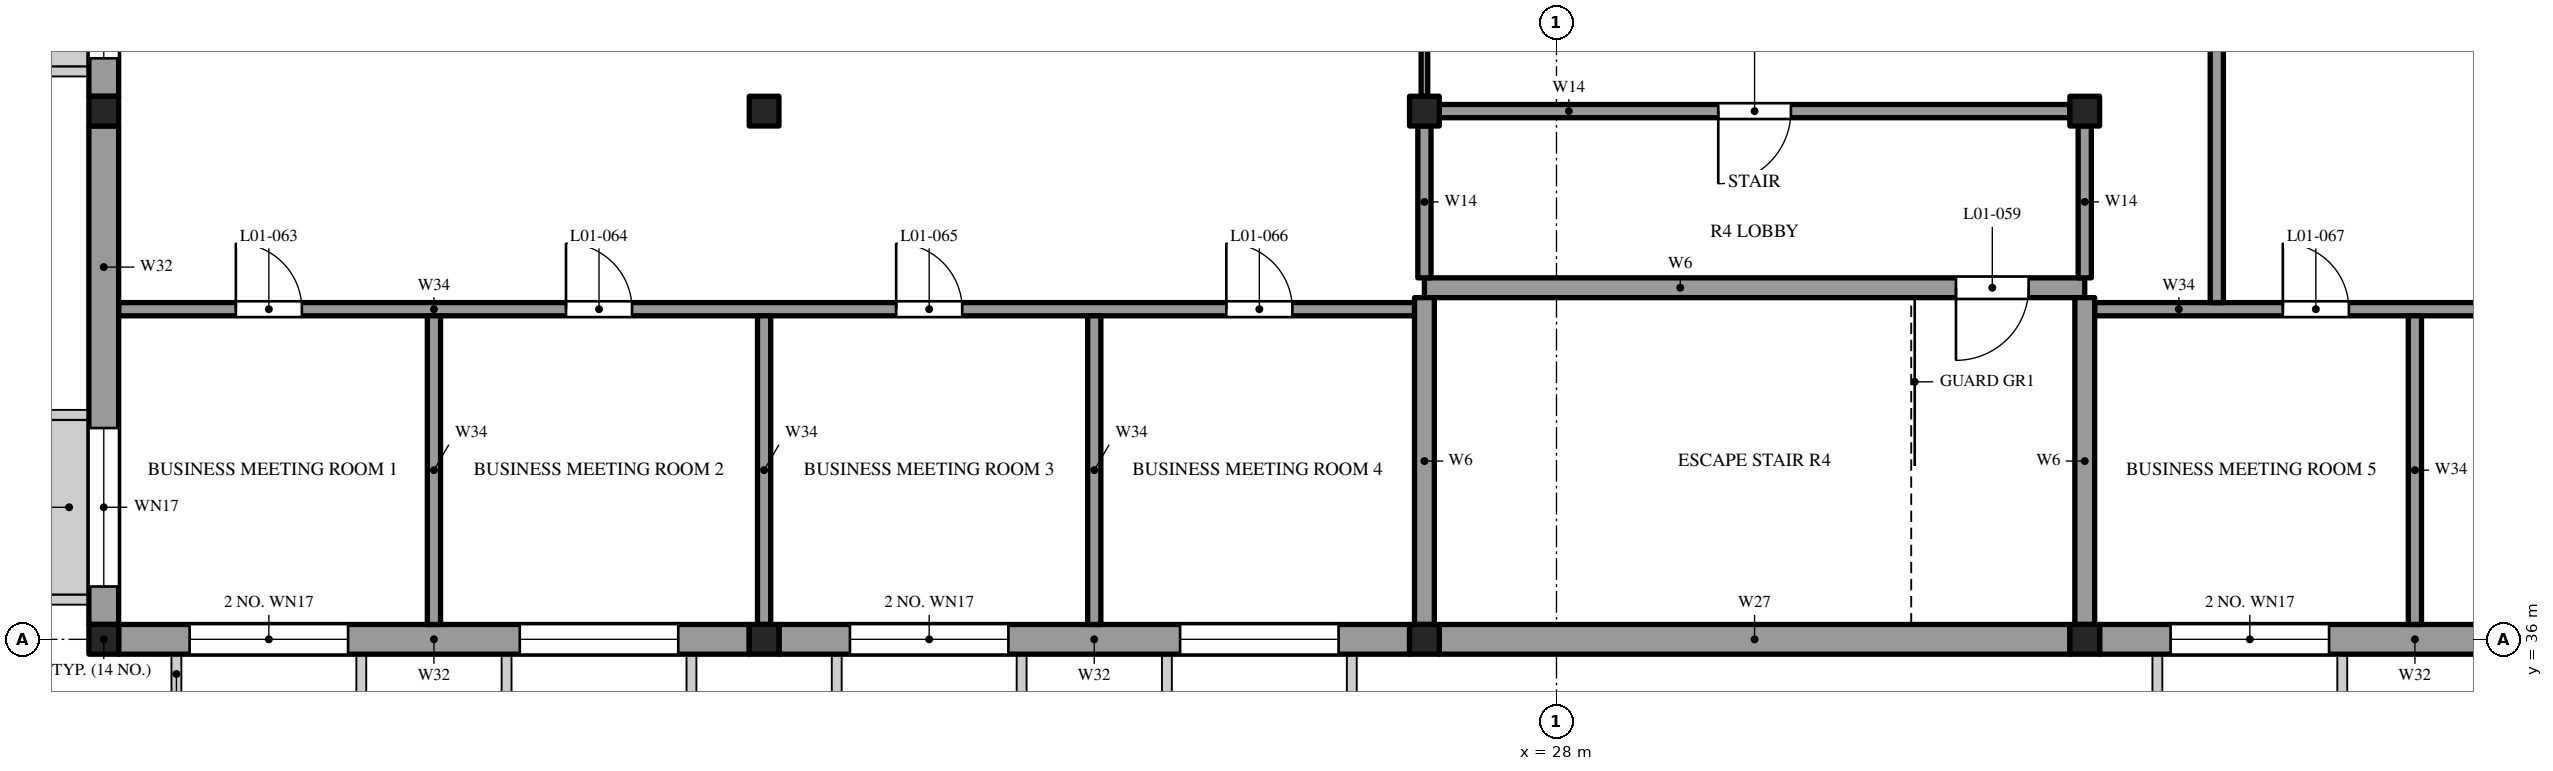
"""IFC4 building model, lengths in metres.
Left out: names, types, materials, properties, quantities, classifications, styles, units other than length and angle.
Written with IfcOpenShell. Run it as: python <this file> out.ifc"""

import sys

from ifc_helpers import new_model, si_unit, direction, frame, frame_2d, origin, origin_2d, place, context, subcontext, project, spatial, rectangle, extrude, element, fill, save


model = new_model("IFC4")
c1 = context("Model", 3, precision=1e-05, world=origin(), true_north=direction((0.0, 1.0)))
c2 = subcontext(c1, "Body", "Model", "MODEL_VIEW")
j1 = project(units=[si_unit("LENGTHUNIT", "METRE"), si_unit("PLANEANGLEUNIT", "RADIAN")], contexts=[c1])
p1 = place(None, origin())
s1 = spatial("IfcSite", under=j1, at=p1, CompositionType="ELEMENT")
p2 = place(p1, origin())
s2 = spatial("IfcBuilding", under=s1, at=p2, CompositionType="ELEMENT")
p3 = place(p2, frame((0.0, 0.0, 7.2)))
s3 = spatial("IfcBuildingStorey", under=s2, at=p3, CompositionType="ELEMENT", Elevation=7.2)
for number, where, z_axis, x_axis in (
    (1, (6.0, 36.0, 0.0), (0.0, 0.0, 1.0), (1.0, 0.0, 0.0)),
    (2, (6.0, 44.0, 0.0), (0.0, 0.0, 1.0), (1.0, 0.0, 0.0)),
    (3, (16.0, 36.0, 0.0), (0.0, 0.0, 1.0), (1.0, 0.0, 0.0)),
    (4, (16.0, 44.0, 0.0), (0.0, 0.0, 1.0), (1.0, 0.0, 0.0)),
    (5, (26.0, 36.0, 0.0), (0.0, 0.0, 1.0), (1.0, 0.0, 0.0)),
    (6, (26.0, 44.0, 0.0), (0.0, 0.0, 1.0), (1.0, 0.0, 0.0)),
    (7, (36.0, 36.0, 0.0), (0.0, 0.0, 1.0), (1.0, 0.0, 0.0)),
    (8, (36.0, 44.0, 0.0), (0.0, 0.0, 1.0), (1.0, 0.0, 0.0)),
):
    element("IfcColumn", number, at=place(p3, frame(where, z_axis=z_axis, x_axis=x_axis)), inside=s3, PredefinedType="COLUMN", context=c2, shape_type="SweptSolid", body=[
        extrude(rectangle(XDim=0.45, YDim=0.45, at=origin_2d()), origin(), (0.0, 0.0, 1.0), 4.8),
    ])
p4 = place(p3, frame((6.225, 36.0, 0.0), z_axis=(0.0, 0.0, 1.0), x_axis=(1.0, 0.0, 0.0)))
e9 = element("IfcWall", 9, at=p4, inside=s3, PredefinedType="SOLIDWALL", context=c2, shape_type="SweptSolid", body=[
    extrude(rectangle(XDim=9.55, YDim=0.45, at=frame_2d((4.775, 0.0))), origin(), (0.0, 0.0, 1.0), 4.45),
])
p5 = place(p4, frame((1.075, 0.0, 0.9)))
e10 = element("IfcOpeningElement", 10, at=p5, cuts=e9, PredefinedType="OPENING", context=c2, shape_type="SweptSolid", body=[
    extrude(rectangle(XDim=2.4, YDim=2.2, at=frame_2d((1.2, 1.1))), frame((0.0, 0.235, 0.0), z_axis=(0.0, -1.0, 0.0), x_axis=(1.0, 0.0, 0.0)), (0.0, 0.0, 1.0), 0.47),
])
p6 = place(p4, frame((6.075, 0.0, 0.9)))
e11 = element("IfcOpeningElement", 11, at=p6, cuts=e9, PredefinedType="OPENING", context=c2, shape_type="SweptSolid", body=[
    extrude(rectangle(XDim=2.4, YDim=2.2, at=frame_2d((1.2, 1.1))), frame((0.0, 0.235, 0.0), z_axis=(0.0, -1.0, 0.0), x_axis=(1.0, 0.0, 0.0)), (0.0, 0.0, 1.0), 0.47),
])
p7 = place(p3, frame((16.225, 36.0, 0.0), z_axis=(0.0, 0.0, 1.0), x_axis=(1.0, 0.0, 0.0)))
e12 = element("IfcWall", 12, at=p7, inside=s3, PredefinedType="SOLIDWALL", context=c2, shape_type="SweptSolid", body=[
    extrude(rectangle(XDim=9.55, YDim=0.45, at=frame_2d((4.775, 0.0))), origin(), (0.0, 0.0, 1.0), 4.45),
])
p8 = place(p7, frame((1.075, 0.0, 0.9)))
e13 = element("IfcOpeningElement", 13, at=p8, cuts=e12, PredefinedType="OPENING", context=c2, shape_type="SweptSolid", body=[
    extrude(rectangle(XDim=2.4, YDim=2.2, at=frame_2d((1.2, 1.1))), frame((0.0, 0.235, 0.0), z_axis=(0.0, -1.0, 0.0), x_axis=(1.0, 0.0, 0.0)), (0.0, 0.0, 1.0), 0.47),
])
p9 = place(p7, frame((6.075, 0.0, 0.9)))
e14 = element("IfcOpeningElement", 14, at=p9, cuts=e12, PredefinedType="OPENING", context=c2, shape_type="SweptSolid", body=[
    extrude(rectangle(XDim=2.4, YDim=2.2, at=frame_2d((1.2, 1.1))), frame((0.0, 0.235, 0.0), z_axis=(0.0, -1.0, 0.0), x_axis=(1.0, 0.0, 0.0)), (0.0, 0.0, 1.0), 0.47),
])
p10 = place(p3, frame((26.225, 36.0, 0.0), z_axis=(0.0, 0.0, 1.0), x_axis=(1.0, 0.0, 0.0)))
e15 = element("IfcWall", 15, at=p10, inside=s3, PredefinedType="SOLIDWALL", context=c2, shape_type="SweptSolid", body=[
    extrude(rectangle(XDim=9.55, YDim=0.45, at=frame_2d((4.775, 0.0))), origin(), (0.0, 0.0, 1.0), 4.45),
])
p11 = place(p3, frame((36.225, 36.0, 0.0), z_axis=(0.0, 0.0, 1.0), x_axis=(1.0, 0.0, 0.0)))
e16 = element("IfcWall", 16, at=p11, inside=s3, PredefinedType="SOLIDWALL", context=c2, shape_type="SweptSolid", body=[
    extrude(rectangle(XDim=9.55, YDim=0.45, at=frame_2d((4.775, 0.0))), origin(), (0.0, 0.0, 1.0), 4.45),
])
p12 = place(p11, frame((1.075, 0.0, 0.9)))
e17 = element("IfcOpeningElement", 17, at=p12, cuts=e16, PredefinedType="OPENING", context=c2, shape_type="SweptSolid", body=[
    extrude(rectangle(XDim=2.4, YDim=2.2, at=frame_2d((1.2, 1.1))), frame((0.0, 0.235, 0.0), z_axis=(0.0, -1.0, 0.0), x_axis=(1.0, 0.0, 0.0)), (0.0, 0.0, 1.0), 0.47),
])
p13 = place(p11, frame((6.075, 0.0, 0.9)))
e18 = element("IfcOpeningElement", 18, at=p13, cuts=e16, PredefinedType="OPENING", context=c2, shape_type="SweptSolid", body=[
    extrude(rectangle(XDim=2.4, YDim=2.2, at=frame_2d((1.2, 1.1))), frame((0.0, 0.235, 0.0), z_axis=(0.0, -1.0, 0.0), x_axis=(1.0, 0.0, 0.0)), (0.0, 0.0, 1.0), 0.47),
])
p14 = place(p3, frame((6.225, 41.0, 0.0), z_axis=(0.0, 0.0, 1.0), x_axis=(1.0, 0.0, 0.0)))
e19 = element("IfcWall", 19, at=p14, inside=s3, PredefinedType="PARTITIONING", context=c2, shape_type="SweptSolid", body=[
    extrude(rectangle(XDim=19.625, YDim=0.2, at=frame_2d((9.812, 0.0))), origin(), (0.0, 0.0, 1.0), 4.45),
])
p15 = place(p14, frame((1.775, 0.0, 0.0)))
e20 = element("IfcOpeningElement", 20, at=p15, cuts=e19, PredefinedType="OPENING", context=c2, shape_type="SweptSolid", body=[
    extrude(rectangle(XDim=1.0, YDim=2.1, at=frame_2d((0.5, 1.05))), frame((0.0, 0.11, 0.0), z_axis=(0.0, -1.0, 0.0), x_axis=(1.0, 0.0, 0.0)), (0.0, 0.0, 1.0), 0.22),
])
p16 = place(p14, frame((6.775, 0.0, 0.0)))
e21 = element("IfcOpeningElement", 21, at=p16, cuts=e19, PredefinedType="OPENING", context=c2, shape_type="SweptSolid", body=[
    extrude(rectangle(XDim=1.0, YDim=2.1, at=frame_2d((0.5, 1.05))), frame((0.0, 0.11, 0.0), z_axis=(0.0, -1.0, 0.0), x_axis=(1.0, 0.0, 0.0)), (0.0, 0.0, 1.0), 0.22),
])
p17 = place(p14, frame((11.775, 0.0, 0.0)))
e22 = element("IfcOpeningElement", 22, at=p17, cuts=e19, PredefinedType="OPENING", context=c2, shape_type="SweptSolid", body=[
    extrude(rectangle(XDim=1.0, YDim=2.1, at=frame_2d((0.5, 1.05))), frame((0.0, 0.11, 0.0), z_axis=(0.0, -1.0, 0.0), x_axis=(1.0, 0.0, 0.0)), (0.0, 0.0, 1.0), 0.22),
])
p18 = place(p14, frame((16.775, 0.0, 0.0)))
e23 = element("IfcOpeningElement", 23, at=p18, cuts=e19, PredefinedType="OPENING", context=c2, shape_type="SweptSolid", body=[
    extrude(rectangle(XDim=1.0, YDim=2.1, at=frame_2d((0.5, 1.05))), frame((0.0, 0.11, 0.0), z_axis=(0.0, -1.0, 0.0), x_axis=(1.0, 0.0, 0.0)), (0.0, 0.0, 1.0), 0.22),
])
p19 = place(p3, frame((36.15, 41.0, 0.0), z_axis=(0.0, 0.0, 1.0), x_axis=(1.0, 0.0, 0.0)))
e24 = element("IfcWall", 24, at=p19, inside=s3, PredefinedType="PARTITIONING", context=c2, shape_type="SweptSolid", body=[
    extrude(rectangle(XDim=9.625, YDim=0.2, at=frame_2d((4.812, 0.0))), origin(), (0.0, 0.0, 1.0), 4.45),
])
p20 = place(p19, frame((2.85, 0.0, 0.0)))
e25 = element("IfcOpeningElement", 25, at=p20, cuts=e24, PredefinedType="OPENING", context=c2, shape_type="SweptSolid", body=[
    extrude(rectangle(XDim=1.0, YDim=2.1, at=frame_2d((0.5, 1.05))), frame((0.0, 0.11, 0.0), z_axis=(0.0, -1.0, 0.0), x_axis=(1.0, 0.0, 0.0)), (0.0, 0.0, 1.0), 0.22),
])
p21 = place(p19, frame((6.85, 0.0, 0.0)))
e26 = element("IfcOpeningElement", 26, at=p21, cuts=e24, PredefinedType="OPENING", context=c2, shape_type="SweptSolid", body=[
    extrude(rectangle(XDim=1.0, YDim=2.1, at=frame_2d((0.5, 1.05))), frame((0.0, 0.11, 0.0), z_axis=(0.0, -1.0, 0.0), x_axis=(1.0, 0.0, 0.0)), (0.0, 0.0, 1.0), 0.22),
])
p22 = place(p3, frame((26.0, 41.325, 0.0), z_axis=(0.0, 0.0, 1.0), x_axis=(1.0, 0.0, 0.0)))
e27 = element("IfcWall", 27, at=p22, inside=s3, PredefinedType="SHEAR", context=c2, shape_type="SweptSolid", body=[
    extrude(rectangle(XDim=10.0, YDim=0.3, at=frame_2d((5.0, 0.0))), origin(), (0.0, 0.0, 1.0), 4.45),
])
p23 = place(p22, frame((8.05, 0.0, 0.0)))
e28 = element("IfcOpeningElement", 28, at=p23, cuts=e27, PredefinedType="OPENING", context=c2, shape_type="SweptSolid", body=[
    extrude(rectangle(XDim=1.1, YDim=2.1, at=frame_2d((0.55, 1.05))), frame((0.0, 0.16, 0.0), z_axis=(0.0, -1.0, 0.0), x_axis=(1.0, 0.0, 0.0)), (0.0, 0.0, 1.0), 0.32),
])
p24 = place(p3, frame((26.225, 44.0, 0.0), z_axis=(0.0, 0.0, 1.0), x_axis=(1.0, 0.0, 0.0)))
e29 = element("IfcWall", 29, at=p24, inside=s3, PredefinedType="SOLIDWALL", context=c2, shape_type="SweptSolid", body=[
    extrude(rectangle(XDim=9.55, YDim=0.2, at=frame_2d((4.775, 0.0))), origin(), (0.0, 0.0, 1.0), 4.45),
])
p25 = place(p24, frame((4.225, 0.0, 0.0)))
e30 = element("IfcOpeningElement", 30, at=p25, cuts=e29, PredefinedType="OPENING", context=c2, shape_type="SweptSolid", body=[
    extrude(rectangle(XDim=1.1, YDim=2.1, at=frame_2d((0.55, 1.05))), frame((0.0, 0.11, 0.0), z_axis=(0.0, -1.0, 0.0), x_axis=(1.0, 0.0, 0.0)), (0.0, 0.0, 1.0), 0.22),
])
p26 = place(p3, frame((6.0, 43.775, 0.0), z_axis=(0.0, 0.0, 1.0), x_axis=(0.0, -1.0, 0.0)))
e31 = element("IfcWall", 31, at=p26, inside=s3, PredefinedType="SOLIDWALL", context=c2, shape_type="SweptSolid", body=[
    extrude(rectangle(XDim=7.55, YDim=0.45, at=frame_2d((3.775, 0.0))), origin(), (0.0, 0.0, 1.0), 4.45),
])
p27 = place(p26, frame((4.575, 0.0, 0.9)))
e32 = element("IfcOpeningElement", 32, at=p27, cuts=e31, PredefinedType="OPENING", context=c2, shape_type="SweptSolid", body=[
    extrude(rectangle(XDim=2.4, YDim=2.2, at=frame_2d((1.2, 1.1))), frame((0.0, 0.235, 0.0), z_axis=(0.0, -1.0, 0.0), x_axis=(1.0, 0.0, 0.0)), (0.0, 0.0, 1.0), 0.47),
])
p28 = place(p3, frame((6.0, 51.775, 0.0), z_axis=(0.0, 0.0, 1.0), x_axis=(0.0, -1.0, 0.0)))
e33 = element("IfcWall", 33, at=p28, inside=s3, PredefinedType="SOLIDWALL", context=c2, shape_type="SweptSolid", body=[
    extrude(rectangle(XDim=7.55, YDim=0.45, at=frame_2d((3.775, 0.0))), origin(), (0.0, 0.0, 1.0), 4.45),
])
p29 = place(p28, frame((4.575, 0.0, 0.9)))
e34 = element("IfcOpeningElement", 34, at=p29, cuts=e33, PredefinedType="OPENING", context=c2, shape_type="SweptSolid", body=[
    extrude(rectangle(XDim=2.4, YDim=2.2, at=frame_2d((1.2, 1.1))), frame((0.0, 0.235, 0.0), z_axis=(0.0, -1.0, 0.0), x_axis=(1.0, 0.0, 0.0)), (0.0, 0.0, 1.0), 0.47),
])
p30 = place(p28, frame((0.575, 0.0, 0.9)))
e35 = element("IfcOpeningElement", 35, at=p30, cuts=e33, PredefinedType="OPENING", context=c2, shape_type="SweptSolid", body=[
    extrude(rectangle(XDim=2.4, YDim=2.2, at=frame_2d((1.2, 1.1))), frame((0.0, 0.235, 0.0), z_axis=(0.0, -1.0, 0.0), x_axis=(1.0, 0.0, 0.0)), (0.0, 0.0, 1.0), 0.47),
])
for number, where, z_axis, x_axis in (
    (36, (11.0, 36.225, 0.0), (0.0, 0.0, 1.0), (0.0, 1.0, 0.0)),
    (37, (16.0, 36.225, 0.0), (0.0, 0.0, 1.0), (0.0, 1.0, 0.0)),
    (38, (21.0, 36.225, 0.0), (0.0, 0.0, 1.0), (0.0, 1.0, 0.0)),
):
    element("IfcWall", number, at=place(p3, frame(where, z_axis=z_axis, x_axis=x_axis)), inside=s3, PredefinedType="PARTITIONING", context=c2, shape_type="SweptSolid", body=[
        extrude(rectangle(XDim=4.675, YDim=0.2, at=frame_2d((2.337, 0.0))), origin(), (0.0, 0.0, 1.0), 4.45),
    ])
p31 = place(p3, frame((26.0, 36.225, 0.0), z_axis=(0.0, 0.0, 1.0), x_axis=(0.0, 1.0, 0.0)))
e39 = element("IfcWall", 39, at=p31, inside=s3, PredefinedType="SHEAR", context=c2, shape_type="SweptSolid", body=[
    extrude(rectangle(XDim=4.95, YDim=0.3, at=frame_2d((2.475, 0.0))), origin(), (0.0, 0.0, 1.0), 4.45),
])
p32 = place(p3, frame((26.0, 41.475, 0.0), z_axis=(0.0, 0.0, 1.0), x_axis=(0.0, 1.0, 0.0)))
e40 = element("IfcWall", 40, at=p32, inside=s3, PredefinedType="SOLIDWALL", context=c2, shape_type="SweptSolid", body=[
    extrude(rectangle(XDim=2.3, YDim=0.2, at=frame_2d((1.15, 0.0))), origin(), (0.0, 0.0, 1.0), 4.45),
])
p33 = place(p3, frame((26.0, 44.225, 0.0), z_axis=(0.0, 0.0, 1.0), x_axis=(0.0, 1.0, 0.0)))
e41 = element("IfcWall", 41, at=p33, inside=s3, PredefinedType="PARTITIONING", context=c2, shape_type="SweptSolid", body=[
    extrude(rectangle(XDim=7.525, YDim=0.1, at=frame_2d((3.762, 0.0))), origin(), (0.0, 0.0, 1.0), 4.45),
])
p34 = place(p3, frame((36.0, 36.225, 0.0), z_axis=(0.0, 0.0, 1.0), x_axis=(0.0, 1.0, 0.0)))
e42 = element("IfcWall", 42, at=p34, inside=s3, PredefinedType="SHEAR", context=c2, shape_type="SweptSolid", body=[
    extrude(rectangle(XDim=4.95, YDim=0.3, at=frame_2d((2.475, 0.0))), origin(), (0.0, 0.0, 1.0), 4.45),
])
p35 = place(p3, frame((36.0, 41.475, 0.0), z_axis=(0.0, 0.0, 1.0), x_axis=(0.0, 1.0, 0.0)))
e43 = element("IfcWall", 43, at=p35, inside=s3, PredefinedType="SOLIDWALL", context=c2, shape_type="SweptSolid", body=[
    extrude(rectangle(XDim=2.3, YDim=0.2, at=frame_2d((1.15, 0.0))), origin(), (0.0, 0.0, 1.0), 4.45),
])
p36 = place(p3, frame((38.0, 41.1, 0.0), z_axis=(0.0, 0.0, 1.0), x_axis=(0.0, 1.0, 0.0)))
e44 = element("IfcWall", 44, at=p36, inside=s3, PredefinedType="PARTITIONING", context=c2, shape_type="SweptSolid", body=[
    extrude(rectangle(XDim=18.8, YDim=0.2, at=frame_2d((9.4, 0.0))), origin(), (0.0, 0.0, 1.0), 4.45),
])
p37 = place(p36, frame((10.3, 0.0, 0.0)))
e45 = element("IfcOpeningElement", 45, at=p37, cuts=e44, PredefinedType="OPENING", context=c2, shape_type="SweptSolid", body=[
    extrude(rectangle(XDim=1.2, YDim=2.1, at=frame_2d((0.6, 1.05))), frame((0.0, 0.11, 0.0), z_axis=(0.0, -1.0, 0.0), x_axis=(1.0, 0.0, 0.0)), (0.0, 0.0, 1.0), 0.22),
])
p38 = place(p3, frame((41.0, 36.225, 0.0), z_axis=(0.0, 0.0, 1.0), x_axis=(0.0, 1.0, 0.0)))
e46 = element("IfcWall", 46, at=p38, inside=s3, PredefinedType="PARTITIONING", context=c2, shape_type="SweptSolid", body=[
    extrude(rectangle(XDim=4.675, YDim=0.2, at=frame_2d((2.337, 0.0))), origin(), (0.0, 0.0, 1.0), 4.45),
])
p39 = place(p25, frame((1.1, 0.0, 0.0), z_axis=(0.0, 0.0, 1.0), x_axis=(-1.0, 0.0, 0.0)))
e47 = element("IfcDoor", 47, at=p39, inside=s3, OperationType="SINGLE_SWING_RIGHT", PredefinedType="DOOR", context=c2, shape_type="SweptSolid", body=[
    extrude(rectangle(XDim=1.1, YDim=2.1, at=frame_2d((0.55, 1.05))), frame((0.0, 0.025, 0.0), z_axis=(0.0, -1.0, 0.0), x_axis=(1.0, 0.0, 0.0)), (0.0, 0.0, 1.0), 0.05),
])
fill(e30, e47)
p40 = place(p23, frame((1.1, 0.0, 0.0), z_axis=(0.0, 0.0, 1.0), x_axis=(-1.0, 0.0, 0.0)))
e48 = element("IfcDoor", 48, at=p40, inside=s3, OperationType="SINGLE_SWING_LEFT", PredefinedType="DOOR", context=c2, shape_type="SweptSolid", body=[
    extrude(rectangle(XDim=1.1, YDim=2.1, at=frame_2d((0.55, 1.05))), frame((0.0, 0.025, 0.0), z_axis=(0.0, -1.0, 0.0), x_axis=(1.0, 0.0, 0.0)), (0.0, 0.0, 1.0), 0.05),
])
fill(e28, e48)
p41 = place(p15, origin())
e49 = element("IfcDoor", 49, at=p41, inside=s3, OperationType="SINGLE_SWING_RIGHT", PredefinedType="DOOR", context=c2, shape_type="SweptSolid", body=[
    extrude(rectangle(XDim=1.0, YDim=2.1, at=frame_2d((0.5, 1.05))), frame((0.0, 0.025, 0.0), z_axis=(0.0, -1.0, 0.0), x_axis=(1.0, 0.0, 0.0)), (0.0, 0.0, 1.0), 0.05),
])
fill(e20, e49)
p42 = place(p16, origin())
e50 = element("IfcDoor", 50, at=p42, inside=s3, OperationType="SINGLE_SWING_LEFT", PredefinedType="DOOR", context=c2, shape_type="SweptSolid", body=[
    extrude(rectangle(XDim=1.0, YDim=2.1, at=frame_2d((0.5, 1.05))), frame((0.0, 0.025, 0.0), z_axis=(0.0, -1.0, 0.0), x_axis=(1.0, 0.0, 0.0)), (0.0, 0.0, 1.0), 0.05),
])
fill(e21, e50)
p43 = place(p17, origin())
e51 = element("IfcDoor", 51, at=p43, inside=s3, OperationType="SINGLE_SWING_RIGHT", PredefinedType="DOOR", context=c2, shape_type="SweptSolid", body=[
    extrude(rectangle(XDim=1.0, YDim=2.1, at=frame_2d((0.5, 1.05))), frame((0.0, 0.025, 0.0), z_axis=(0.0, -1.0, 0.0), x_axis=(1.0, 0.0, 0.0)), (0.0, 0.0, 1.0), 0.05),
])
fill(e22, e51)
p44 = place(p18, origin())
e52 = element("IfcDoor", 52, at=p44, inside=s3, OperationType="SINGLE_SWING_LEFT", PredefinedType="DOOR", context=c2, shape_type="SweptSolid", body=[
    extrude(rectangle(XDim=1.0, YDim=2.1, at=frame_2d((0.5, 1.05))), frame((0.0, 0.025, 0.0), z_axis=(0.0, -1.0, 0.0), x_axis=(1.0, 0.0, 0.0)), (0.0, 0.0, 1.0), 0.05),
])
fill(e23, e52)
p45 = place(p20, origin())
e53 = element("IfcDoor", 53, at=p45, inside=s3, OperationType="SINGLE_SWING_RIGHT", PredefinedType="DOOR", context=c2, shape_type="SweptSolid", body=[
    extrude(rectangle(XDim=1.0, YDim=2.1, at=frame_2d((0.5, 1.05))), frame((0.0, 0.025, 0.0), z_axis=(0.0, -1.0, 0.0), x_axis=(1.0, 0.0, 0.0)), (0.0, 0.0, 1.0), 0.05),
])
fill(e25, e53)
p46 = place(p5, origin())
e54 = element("IfcWindow", 54, at=p46, inside=s3, PartitioningType="SINGLE_PANEL", PredefinedType="WINDOW", context=c2, shape_type="SweptSolid", body=[
    extrude(rectangle(XDim=2.4, YDim=2.2, at=frame_2d((1.2, 1.1))), frame((0.0, 0.215, 0.0), z_axis=(0.0, -1.0, 0.0), x_axis=(1.0, 0.0, 0.0)), (0.0, 0.0, 1.0), 0.06),
])
fill(e10, e54)
p47 = place(p6, origin())
e55 = element("IfcWindow", 55, at=p47, inside=s3, PartitioningType="SINGLE_PANEL", PredefinedType="WINDOW", context=c2, shape_type="SweptSolid", body=[
    extrude(rectangle(XDim=2.4, YDim=2.2, at=frame_2d((1.2, 1.1))), frame((0.0, 0.215, 0.0), z_axis=(0.0, -1.0, 0.0), x_axis=(1.0, 0.0, 0.0)), (0.0, 0.0, 1.0), 0.06),
])
fill(e11, e55)
p48 = place(p8, origin())
e56 = element("IfcWindow", 56, at=p48, inside=s3, PartitioningType="SINGLE_PANEL", PredefinedType="WINDOW", context=c2, shape_type="SweptSolid", body=[
    extrude(rectangle(XDim=2.4, YDim=2.2, at=frame_2d((1.2, 1.1))), frame((0.0, 0.215, 0.0), z_axis=(0.0, -1.0, 0.0), x_axis=(1.0, 0.0, 0.0)), (0.0, 0.0, 1.0), 0.06),
])
fill(e13, e56)
p49 = place(p9, origin())
e57 = element("IfcWindow", 57, at=p49, inside=s3, PartitioningType="SINGLE_PANEL", PredefinedType="WINDOW", context=c2, shape_type="SweptSolid", body=[
    extrude(rectangle(XDim=2.4, YDim=2.2, at=frame_2d((1.2, 1.1))), frame((0.0, 0.215, 0.0), z_axis=(0.0, -1.0, 0.0), x_axis=(1.0, 0.0, 0.0)), (0.0, 0.0, 1.0), 0.06),
])
fill(e14, e57)
p50 = place(p12, origin())
e58 = element("IfcWindow", 58, at=p50, inside=s3, PartitioningType="SINGLE_PANEL", PredefinedType="WINDOW", context=c2, shape_type="SweptSolid", body=[
    extrude(rectangle(XDim=2.4, YDim=2.2, at=frame_2d((1.2, 1.1))), frame((0.0, 0.215, 0.0), z_axis=(0.0, -1.0, 0.0), x_axis=(1.0, 0.0, 0.0)), (0.0, 0.0, 1.0), 0.06),
])
fill(e17, e58)
p51 = place(p27, origin())
e59 = element("IfcWindow", 59, at=p51, inside=s3, PartitioningType="SINGLE_PANEL", PredefinedType="WINDOW", context=c2, shape_type="SweptSolid", body=[
    extrude(rectangle(XDim=2.4, YDim=2.2, at=frame_2d((1.2, 1.1))), frame((0.0, 0.215, 0.0), z_axis=(0.0, -1.0, 0.0), x_axis=(1.0, 0.0, 0.0)), (0.0, 0.0, 1.0), 0.06),
])
fill(e32, e59)
p52 = place(p29, origin())
e60 = element("IfcWindow", 60, at=p52, inside=s3, PartitioningType="SINGLE_PANEL", PredefinedType="WINDOW", context=c2, shape_type="SweptSolid", body=[
    extrude(rectangle(XDim=2.4, YDim=2.2, at=frame_2d((1.2, 1.1))), frame((0.0, 0.215, 0.0), z_axis=(0.0, -1.0, 0.0), x_axis=(1.0, 0.0, 0.0)), (0.0, 0.0, 1.0), 0.06),
])
fill(e34, e60)
save(model, sys.argv[1])
